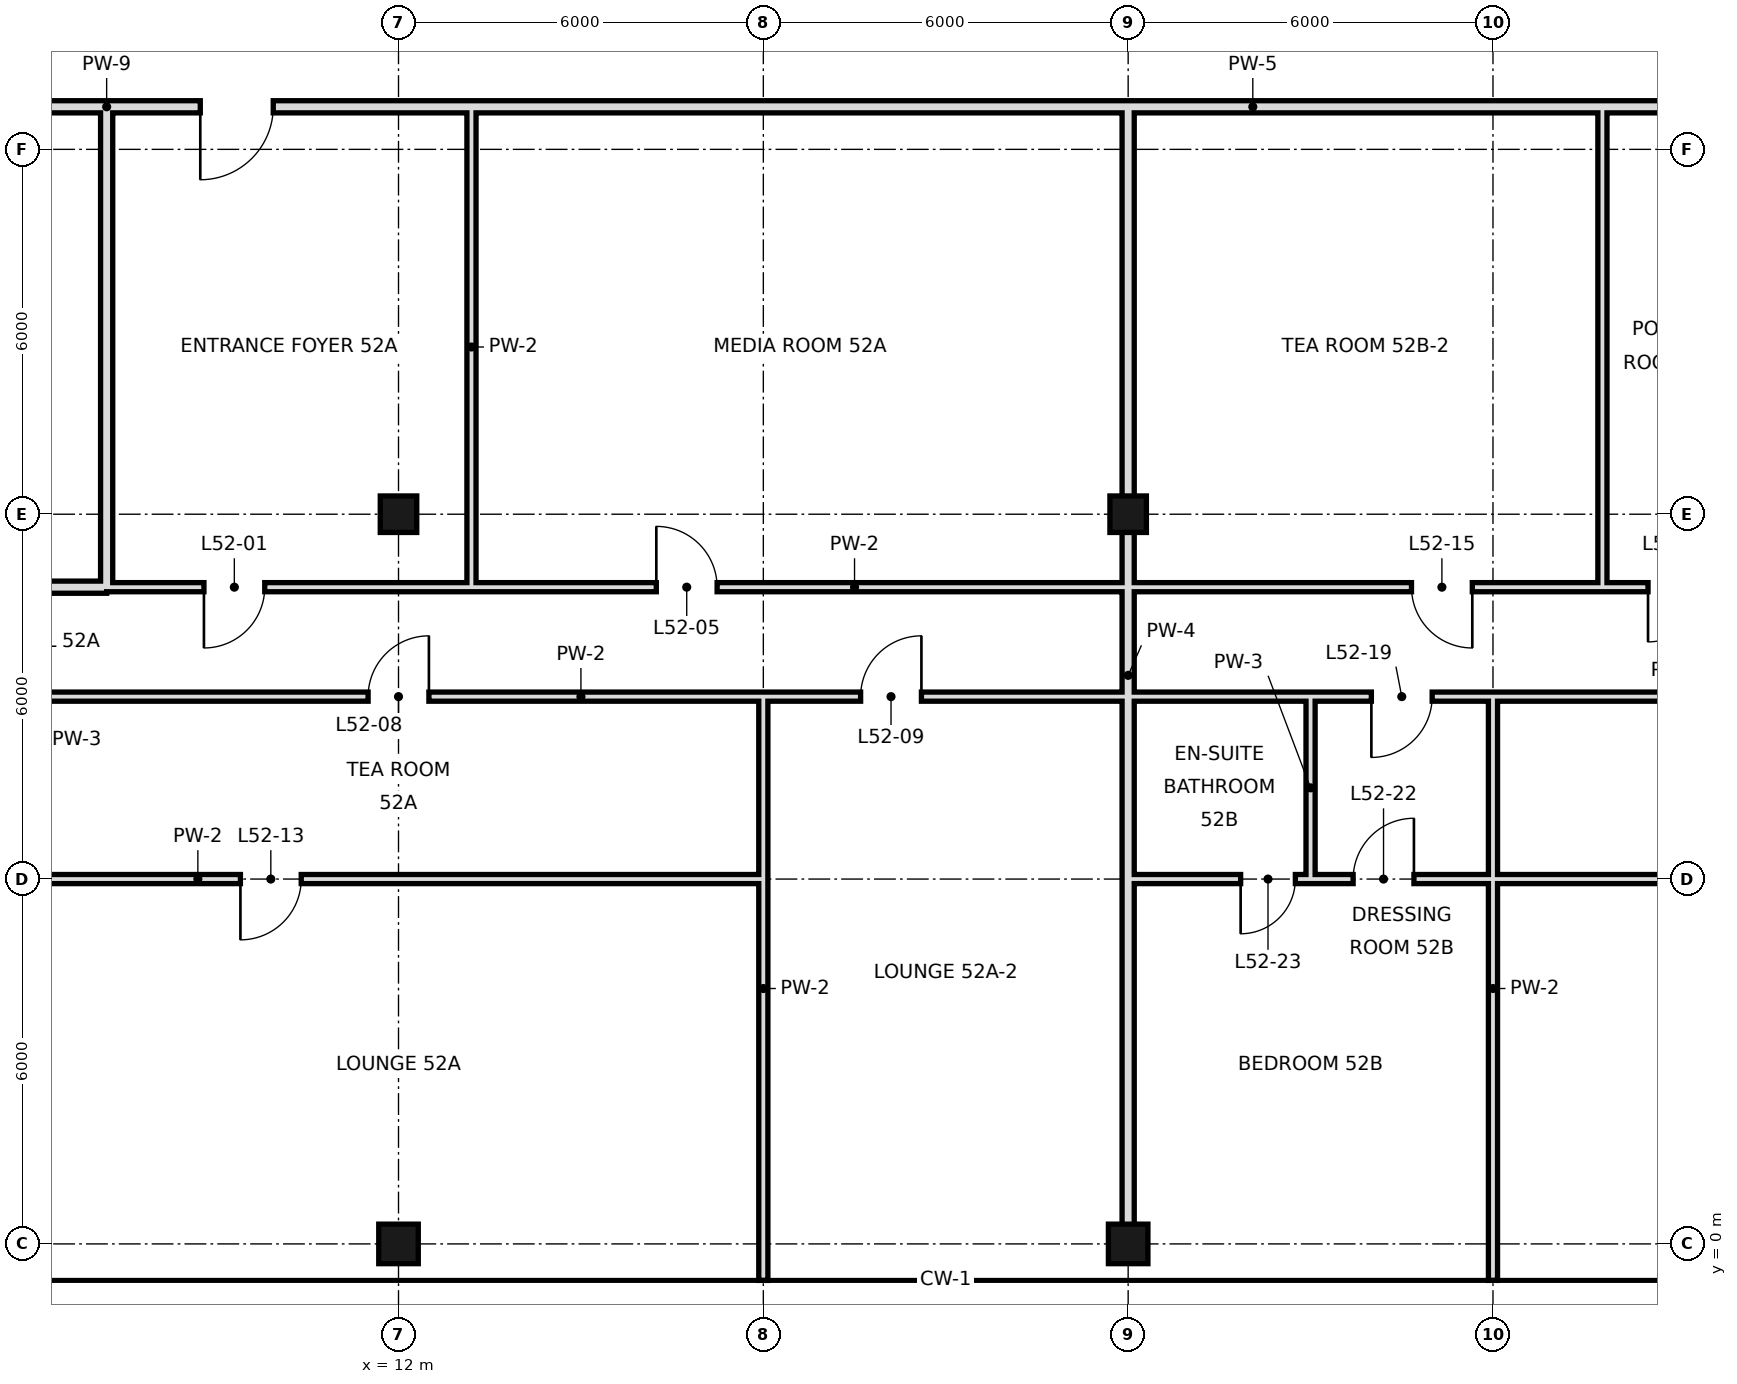
"""IFC4 building model, lengths in metres.
Left out: names, types, materials, properties, quantities, classifications, styles, units other than length and angle.
Written with IfcOpenShell. Run it as: python <this file> out.ifc"""

import sys

from ifc_helpers import new_model, si_unit, direction, frame, frame_2d, origin, origin_2d, place, context, subcontext, project, spatial, rectangle, hollow_rectangle, extrude, element, fill, save


model = new_model("IFC4")
c1 = context("Model", 3, precision=1e-05, world=origin(), true_north=direction((0.0, 1.0)))
c2 = subcontext(c1, "Body", "Model", "MODEL_VIEW")
j1 = project(units=[si_unit("LENGTHUNIT", "METRE"), si_unit("PLANEANGLEUNIT", "RADIAN")], contexts=[c1])
p1 = place(None, origin())
s1 = spatial("IfcSite", under=j1, at=p1, CompositionType="ELEMENT")
p2 = place(p1, origin())
s2 = spatial("IfcBuilding", under=s1, at=p2, CompositionType="ELEMENT")
p3 = place(p2, frame((0.0, 0.0, 222.6)))
s3 = spatial("IfcBuildingStorey", under=s2, at=p3, CompositionType="ELEMENT", Elevation=222.6)
p4 = place(p3, frame((12.0, 0.0, 0.0), z_axis=(0.0, 0.0, 1.0), x_axis=(1.0, 0.0, 0.0)))
e1 = element("IfcColumn", 1, at=p4, inside=s3, PredefinedType="COLUMN", context=c2, shape_type="SweptSolid", body=[
    extrude(hollow_rectangle(XDim=0.65, YDim=0.65, WallThickness=0.032, at=origin_2d()), origin(), (0.0, 0.0, 1.0), 3.6),
])
p5 = place(p3, frame((12.0, 12.0, 0.0), z_axis=(0.0, 0.0, 1.0), x_axis=(1.0, 0.0, 0.0)))
e2 = element("IfcColumn", 2, at=p5, inside=s3, PredefinedType="COLUMN", context=c2, shape_type="SweptSolid", body=[
    extrude(hollow_rectangle(XDim=0.6, YDim=0.6, WallThickness=0.028, at=origin_2d()), origin(), (0.0, 0.0, 1.0), 3.6),
])
p6 = place(p3, frame((24.0, 0.0, 0.0), z_axis=(0.0, 0.0, 1.0), x_axis=(1.0, 0.0, 0.0)))
e3 = element("IfcColumn", 3, at=p6, inside=s3, PredefinedType="COLUMN", context=c2, shape_type="SweptSolid", body=[
    extrude(hollow_rectangle(XDim=0.65, YDim=0.65, WallThickness=0.032, at=origin_2d()), origin(), (0.0, 0.0, 1.0), 3.6),
])
p7 = place(p3, frame((24.0, 12.0, 0.0), z_axis=(0.0, 0.0, 1.0), x_axis=(1.0, 0.0, 0.0)))
e4 = element("IfcColumn", 4, at=p7, inside=s3, PredefinedType="COLUMN", context=c2, shape_type="SweptSolid", body=[
    extrude(hollow_rectangle(XDim=0.6, YDim=0.6, WallThickness=0.028, at=origin_2d()), origin(), (0.0, 0.0, 1.0), 3.6),
])
p8 = place(p3, frame((13.2, 10.8, 0.0), z_axis=(0.0, 0.0, 1.0), x_axis=(0.0, 1.0, 0.0)))
e5 = element("IfcWall", 5, at=p8, inside=s3, PredefinedType="PARTITIONING", context=c2, shape_type="SweptSolid", body=[
    extrude(rectangle(XDim=7.9, YDim=0.15, at=frame_2d((3.95, 0.0))), origin(), (0.0, 0.0, 1.0), 3.42),
])
p9 = place(p3, frame((18.0, -0.6, 0.0), z_axis=(0.0, 0.0, 1.0), x_axis=(0.0, 1.0, 0.0)))
e6 = element("IfcWall", 6, at=p9, inside=s3, PredefinedType="PARTITIONING", context=c2, shape_type="SweptSolid", body=[
    extrude(rectangle(XDim=9.6, YDim=0.15, at=frame_2d((4.8, 0.0))), origin(), (0.0, 0.0, 1.0), 2.72),
])
p10 = place(p3, frame((24.0, 0.0, 0.0), z_axis=(0.0, 0.0, 1.0), x_axis=(0.0, 1.0, 0.0)))
e7 = element("IfcWall", 7, at=p10, inside=s3, PredefinedType="SOLIDWALL", context=c2, shape_type="SweptSolid", body=[
    extrude(rectangle(XDim=18.7, YDim=0.2, at=frame_2d((9.35, 0.0))), origin(), (0.0, 0.0, 1.0), 2.72),
])
p11 = place(p3, frame((27.0, 6.0, 0.0), z_axis=(0.0, 0.0, 1.0), x_axis=(0.0, 1.0, 0.0)))
e8 = element("IfcWall", 8, at=p11, inside=s3, PredefinedType="PARTITIONING", context=c2, shape_type="SweptSolid", body=[
    extrude(rectangle(XDim=3.0, YDim=0.15, at=frame_2d((1.5, 0.0))), origin(), (0.0, 0.0, 1.0), 3.42),
])
p12 = place(p3, frame((30.0, -0.6, 0.0), z_axis=(0.0, 0.0, 1.0), x_axis=(0.0, 1.0, 0.0)))
e9 = element("IfcWall", 9, at=p12, inside=s3, PredefinedType="PARTITIONING", context=c2, shape_type="SweptSolid", body=[
    extrude(rectangle(XDim=9.6, YDim=0.15, at=frame_2d((4.8, 0.0))), origin(), (0.0, 0.0, 1.0), 2.72),
])
p13 = place(p3, frame((31.8, 10.8, 0.0), z_axis=(0.0, 0.0, 1.0), x_axis=(0.0, 1.0, 0.0)))
e10 = element("IfcWall", 10, at=p13, inside=s3, PredefinedType="PARTITIONING", context=c2, shape_type="SweptSolid", body=[
    extrude(rectangle(XDim=7.9, YDim=0.15, at=frame_2d((3.95, 0.0))), origin(), (0.0, 0.0, 1.0), 3.42),
])
p14 = place(p3, frame((7.2, 10.8, 0.0), z_axis=(0.0, 0.0, 1.0), x_axis=(0.0, 1.0, 0.0)))
e11 = element("IfcWall", 11, at=p14, inside=s3, PredefinedType="SOLIDWALL", context=c2, shape_type="SweptSolid", body=[
    extrude(rectangle(XDim=7.9, YDim=0.2, at=frame_2d((3.95, 0.0))), origin(), (0.0, 0.0, 1.0), 2.72),
])
p15 = place(p3, frame((1.8, 10.8, 0.0), z_axis=(0.0, 0.0, 1.0), x_axis=(1.0, 0.0, 0.0)))
e12 = element("IfcWall", 12, at=p15, inside=s3, PredefinedType="SOLIDWALL", context=c2, shape_type="SweptSolid", body=[
    extrude(rectangle(XDim=5.4, YDim=0.2, at=frame_2d((2.7, 0.0))), origin(), (0.0, 0.0, 1.0), 2.72),
])
p16 = place(p15, frame((2.98, 0.0, 0.0)))
e13 = element("IfcOpeningElement", 13, at=p16, cuts=e12, PredefinedType="OPENING", context=c2, shape_type="SweptSolid", body=[
    extrude(rectangle(XDim=1.0, YDim=2.4, at=frame_2d((0.5, 1.2))), frame((0.0, 0.11, 0.0), z_axis=(0.0, -1.0, 0.0), x_axis=(1.0, 0.0, 0.0)), (0.0, 0.0, 1.0), 0.22),
])
p17 = place(p3, frame((7.2, 10.8, 0.0), z_axis=(0.0, 0.0, 1.0), x_axis=(1.0, 0.0, 0.0)))
e14 = element("IfcWall", 14, at=p17, inside=s3, PredefinedType="PARTITIONING", context=c2, shape_type="SweptSolid", body=[
    extrude(rectangle(XDim=24.6, YDim=0.15, at=frame_2d((12.3, 0.0))), origin(), (0.0, 0.0, 1.0), 3.42),
])
p18 = place(p17, frame((1.6, 0.0, 0.0)))
e15 = element("IfcOpeningElement", 15, at=p18, cuts=e14, PredefinedType="OPENING", context=c2, shape_type="SweptSolid", body=[
    extrude(rectangle(XDim=1.0, YDim=2.4, at=frame_2d((0.5, 1.2))), frame((0.0, 0.085, 0.0), z_axis=(0.0, -1.0, 0.0), x_axis=(1.0, 0.0, 0.0)), (0.0, 0.0, 1.0), 0.17),
])
p19 = place(p17, frame((9.04, 0.0, 0.0)))
e16 = element("IfcOpeningElement", 16, at=p19, cuts=e14, PredefinedType="OPENING", context=c2, shape_type="SweptSolid", body=[
    extrude(rectangle(XDim=1.0, YDim=2.4, at=frame_2d((0.5, 1.2))), frame((0.0, 0.085, 0.0), z_axis=(0.0, -1.0, 0.0), x_axis=(1.0, 0.0, 0.0)), (0.0, 0.0, 1.0), 0.17),
])
p20 = place(p17, frame((21.46, 0.0, 0.0)))
e17 = element("IfcOpeningElement", 17, at=p20, cuts=e14, PredefinedType="OPENING", context=c2, shape_type="SweptSolid", body=[
    extrude(rectangle(XDim=1.0, YDim=2.4, at=frame_2d((0.5, 1.2))), frame((0.0, 0.085, 0.0), z_axis=(0.0, -1.0, 0.0), x_axis=(1.0, 0.0, 0.0)), (0.0, 0.0, 1.0), 0.17),
])
p21 = place(p3, frame((31.8, 10.8, 0.0), z_axis=(0.0, 0.0, 1.0), x_axis=(1.0, 0.0, 0.0)))
e18 = element("IfcWall", 18, at=p21, inside=s3, PredefinedType="PARTITIONING", context=c2, shape_type="SweptSolid", body=[
    extrude(rectangle(XDim=2.4, YDim=0.15, at=frame_2d((1.2, 0.0))), origin(), (0.0, 0.0, 1.0), 3.42),
])
p22 = place(p21, frame((0.75, 0.0, 0.0)))
e19 = element("IfcOpeningElement", 19, at=p22, cuts=e18, PredefinedType="OPENING", context=c2, shape_type="SweptSolid", body=[
    extrude(rectangle(XDim=0.9, YDim=2.4, at=frame_2d((0.45, 1.2))), frame((0.0, 0.085, 0.0), z_axis=(0.0, -1.0, 0.0), x_axis=(1.0, 0.0, 0.0)), (0.0, 0.0, 1.0), 0.17),
])
p23 = place(p3, frame((7.2, 18.7, 0.0), z_axis=(0.0, 0.0, 1.0), x_axis=(1.0, 0.0, 0.0)))
e20 = element("IfcWall", 20, at=p23, inside=s3, PredefinedType="SOLIDWALL", context=c2, shape_type="SweptSolid", body=[
    extrude(rectangle(XDim=37.7, YDim=0.2, at=frame_2d((18.85, 0.0))), origin(), (0.0, 0.0, 1.0), 2.72),
])
p24 = place(p23, frame((1.54, 0.0, 0.0)))
e21 = element("IfcOpeningElement", 21, at=p24, cuts=e20, PredefinedType="OPENING", context=c2, shape_type="SweptSolid", body=[
    extrude(rectangle(XDim=1.2, YDim=2.4, at=frame_2d((0.6, 1.2))), frame((0.0, 0.11, 0.0), z_axis=(0.0, -1.0, 0.0), x_axis=(1.0, 0.0, 0.0)), (0.0, 0.0, 1.0), 0.22),
])
p25 = place(p23, frame((30.26, 0.0, 0.0)))
e22 = element("IfcOpeningElement", 22, at=p25, cuts=e20, PredefinedType="OPENING", context=c2, shape_type="SweptSolid", body=[
    extrude(rectangle(XDim=1.2, YDim=2.4, at=frame_2d((0.6, 1.2))), frame((0.0, 0.11, 0.0), z_axis=(0.0, -1.0, 0.0), x_axis=(1.0, 0.0, 0.0)), (0.0, 0.0, 1.0), 0.22),
])
p26 = place(p3, frame((3.1, 18.7, 0.0), z_axis=(0.0, 0.0, 1.0), x_axis=(1.0, 0.0, 0.0)))
e23 = element("IfcWall", 23, at=p26, inside=s3, PredefinedType="SOLIDWALL", context=c2, shape_type="SweptSolid", body=[
    extrude(rectangle(XDim=4.1, YDim=0.2, at=frame_2d((2.05, 0.0))), origin(), (0.0, 0.0, 1.0), 2.72),
])
p27 = place(p3, frame((6.0, 6.0, 0.0), z_axis=(0.0, 0.0, 1.0), x_axis=(1.0, 0.0, 0.0)))
e24 = element("IfcWall", 24, at=p27, inside=s3, PredefinedType="PARTITIONING", context=c2, shape_type="SweptSolid", body=[
    extrude(rectangle(XDim=12.0, YDim=0.15, at=frame_2d((6.0, 0.0))), origin(), (0.0, 0.0, 1.0), 2.97),
])
p28 = place(p27, frame((3.4, 0.0, 0.0)))
e25 = element("IfcOpeningElement", 25, at=p28, cuts=e24, PredefinedType="OPENING", context=c2, shape_type="SweptSolid", body=[
    extrude(rectangle(XDim=1.0, YDim=2.4, at=frame_2d((0.5, 1.2))), frame((0.0, 0.085, 0.0), z_axis=(0.0, -1.0, 0.0), x_axis=(1.0, 0.0, 0.0)), (0.0, 0.0, 1.0), 0.17),
])
p29 = place(p3, frame((27.0, 6.0, 0.0), z_axis=(0.0, 0.0, 1.0), x_axis=(1.0, 0.0, 0.0)))
e26 = element("IfcWall", 26, at=p29, inside=s3, PredefinedType="PARTITIONING", context=c2, shape_type="SweptSolid", body=[
    extrude(rectangle(XDim=27.0, YDim=0.15, at=frame_2d((13.5, 0.0))), origin(), (0.0, 0.0, 1.0), 2.97),
])
p30 = place(p29, frame((0.7, 0.0, 0.0)))
e27 = element("IfcOpeningElement", 27, at=p30, cuts=e26, PredefinedType="OPENING", context=c2, shape_type="SweptSolid", body=[
    extrude(rectangle(XDim=1.0, YDim=2.4, at=frame_2d((0.5, 1.2))), frame((0.0, 0.085, 0.0), z_axis=(0.0, -1.0, 0.0), x_axis=(1.0, 0.0, 0.0)), (0.0, 0.0, 1.0), 0.17),
])
p31 = place(p29, frame((8.1, 0.0, 0.0)))
e28 = element("IfcOpeningElement", 28, at=p31, cuts=e26, PredefinedType="OPENING", context=c2, shape_type="SweptSolid", body=[
    extrude(rectangle(XDim=1.8, YDim=2.4, at=frame_2d((0.9, 1.2))), frame((0.0, 0.085, 0.0), z_axis=(0.0, -1.0, 0.0), x_axis=(1.0, 0.0, 0.0)), (0.0, 0.0, 1.0), 0.17),
])
p32 = place(p29, frame((20.5, 0.0, 0.0)))
e29 = element("IfcOpeningElement", 29, at=p32, cuts=e26, PredefinedType="OPENING", context=c2, shape_type="SweptSolid", body=[
    extrude(rectangle(XDim=1.0, YDim=2.4, at=frame_2d((0.5, 1.2))), frame((0.0, 0.085, 0.0), z_axis=(0.0, -1.0, 0.0), x_axis=(1.0, 0.0, 0.0)), (0.0, 0.0, 1.0), 0.17),
])
p33 = place(p3, frame((24.0, 6.0, 0.0), z_axis=(0.0, 0.0, 1.0), x_axis=(1.0, 0.0, 0.0)))
e30 = element("IfcWall", 30, at=p33, inside=s3, PredefinedType="PARTITIONING", context=c2, shape_type="SweptSolid", body=[
    extrude(rectangle(XDim=3.0, YDim=0.15, at=frame_2d((1.5, 0.0))), origin(), (0.0, 0.0, 1.0), 2.97),
])
p34 = place(p33, frame((1.85, 0.0, 0.0)))
e31 = element("IfcOpeningElement", 31, at=p34, cuts=e30, PredefinedType="OPENING", context=c2, shape_type="SweptSolid", body=[
    extrude(rectangle(XDim=0.9, YDim=2.4, at=frame_2d((0.45, 1.2))), frame((0.0, 0.085, 0.0), z_axis=(0.0, -1.0, 0.0), x_axis=(1.0, 0.0, 0.0)), (0.0, 0.0, 1.0), 0.17),
])
p35 = place(p3, frame((6.0, 9.0, 0.0), z_axis=(0.0, 0.0, 1.0), x_axis=(1.0, 0.0, 0.0)))
e32 = element("IfcWall", 32, at=p35, inside=s3, PredefinedType="PARTITIONING", context=c2, shape_type="SweptSolid", body=[
    extrude(rectangle(XDim=18.0, YDim=0.15, at=frame_2d((9.0, 0.0))), origin(), (0.0, 0.0, 1.0), 3.42),
])
p36 = place(p35, frame((5.5, 0.0, 0.0)))
e33 = element("IfcOpeningElement", 33, at=p36, cuts=e32, PredefinedType="OPENING", context=c2, shape_type="SweptSolid", body=[
    extrude(rectangle(XDim=1.0, YDim=2.4, at=frame_2d((0.5, 1.2))), frame((0.0, 0.085, 0.0), z_axis=(0.0, -1.0, 0.0), x_axis=(1.0, 0.0, 0.0)), (0.0, 0.0, 1.0), 0.17),
])
p37 = place(p35, frame((13.6, 0.0, 0.0)))
e34 = element("IfcOpeningElement", 34, at=p37, cuts=e32, PredefinedType="OPENING", context=c2, shape_type="SweptSolid", body=[
    extrude(rectangle(XDim=1.0, YDim=2.4, at=frame_2d((0.5, 1.2))), frame((0.0, 0.085, 0.0), z_axis=(0.0, -1.0, 0.0), x_axis=(1.0, 0.0, 0.0)), (0.0, 0.0, 1.0), 0.17),
])
p38 = place(p3, frame((27.0, 9.0, 0.0), z_axis=(0.0, 0.0, 1.0), x_axis=(1.0, 0.0, 0.0)))
e35 = element("IfcWall", 35, at=p38, inside=s3, PredefinedType="PARTITIONING", context=c2, shape_type="SweptSolid", body=[
    extrude(rectangle(XDim=27.6, YDim=0.15, at=frame_2d((13.8, 0.0))), origin(), (0.0, 0.0, 1.0), 3.42),
])
p39 = place(p38, frame((1.0, 0.0, 0.0)))
e36 = element("IfcOpeningElement", 36, at=p39, cuts=e35, PredefinedType="OPENING", context=c2, shape_type="SweptSolid", body=[
    extrude(rectangle(XDim=1.0, YDim=2.4, at=frame_2d((0.5, 1.2))), frame((0.0, 0.085, 0.0), z_axis=(0.0, -1.0, 0.0), x_axis=(1.0, 0.0, 0.0)), (0.0, 0.0, 1.0), 0.17),
])
p40 = place(p38, frame((8.1, 0.0, 0.0)))
e37 = element("IfcOpeningElement", 37, at=p40, cuts=e35, PredefinedType="OPENING", context=c2, shape_type="SweptSolid", body=[
    extrude(rectangle(XDim=1.8, YDim=2.4, at=frame_2d((0.9, 1.2))), frame((0.0, 0.085, 0.0), z_axis=(0.0, -1.0, 0.0), x_axis=(1.0, 0.0, 0.0)), (0.0, 0.0, 1.0), 0.17),
])
p41 = place(p38, frame((20.5, 0.0, 0.0)))
e38 = element("IfcOpeningElement", 38, at=p41, cuts=e35, PredefinedType="OPENING", context=c2, shape_type="SweptSolid", body=[
    extrude(rectangle(XDim=1.0, YDim=2.4, at=frame_2d((0.5, 1.2))), frame((0.0, 0.085, 0.0), z_axis=(0.0, -1.0, 0.0), x_axis=(1.0, 0.0, 0.0)), (0.0, 0.0, 1.0), 0.17),
])
p42 = place(p3, frame((24.0, 9.0, 0.0), z_axis=(0.0, 0.0, 1.0), x_axis=(1.0, 0.0, 0.0)))
e39 = element("IfcWall", 39, at=p42, inside=s3, PredefinedType="PARTITIONING", context=c2, shape_type="SweptSolid", body=[
    extrude(rectangle(XDim=3.0, YDim=0.15, at=frame_2d((1.5, 0.0))), origin(), (0.0, 0.0, 1.0), 3.42),
])
p43 = place(p18, frame((1.0, 0.0, 0.0), z_axis=(0.0, 0.0, 1.0), x_axis=(-1.0, 0.0, 0.0)))
e40 = element("IfcDoor", 40, at=p43, inside=s3, OperationType="SINGLE_SWING_RIGHT", PredefinedType="DOOR", context=c2, shape_type="SweptSolid", body=[
    extrude(rectangle(XDim=1.0, YDim=2.4, at=frame_2d((0.5, 1.2))), frame((0.0, 0.025, 0.0), z_axis=(0.0, -1.0, 0.0), x_axis=(1.0, 0.0, 0.0)), (0.0, 0.0, 1.0), 0.05),
])
fill(e15, e40)
p44 = place(p19, origin())
e41 = element("IfcDoor", 41, at=p44, inside=s3, OperationType="SINGLE_SWING_LEFT", PredefinedType="DOOR", context=c2, shape_type="SweptSolid", body=[
    extrude(rectangle(XDim=1.0, YDim=2.4, at=frame_2d((0.5, 1.2))), frame((0.0, 0.025, 0.0), z_axis=(0.0, -1.0, 0.0), x_axis=(1.0, 0.0, 0.0)), (0.0, 0.0, 1.0), 0.05),
])
fill(e16, e41)
p45 = place(p36, frame((1.0, 0.0, 0.0), z_axis=(0.0, 0.0, 1.0), x_axis=(-1.0, 0.0, 0.0)))
e42 = element("IfcDoor", 42, at=p45, inside=s3, OperationType="SINGLE_SWING_LEFT", PredefinedType="DOOR", context=c2, shape_type="SweptSolid", body=[
    extrude(rectangle(XDim=1.0, YDim=2.4, at=frame_2d((0.5, 1.2))), frame((0.0, 0.025, 0.0), z_axis=(0.0, -1.0, 0.0), x_axis=(1.0, 0.0, 0.0)), (0.0, 0.0, 1.0), 0.05),
])
fill(e33, e42)
p46 = place(p37, frame((1.0, 0.0, 0.0), z_axis=(0.0, 0.0, 1.0), x_axis=(-1.0, 0.0, 0.0)))
e43 = element("IfcDoor", 43, at=p46, inside=s3, OperationType="SINGLE_SWING_LEFT", PredefinedType="DOOR", context=c2, shape_type="SweptSolid", body=[
    extrude(rectangle(XDim=1.0, YDim=2.4, at=frame_2d((0.5, 1.2))), frame((0.0, 0.025, 0.0), z_axis=(0.0, -1.0, 0.0), x_axis=(1.0, 0.0, 0.0)), (0.0, 0.0, 1.0), 0.05),
])
fill(e34, e43)
p47 = place(p28, frame((1.0, 0.0, 0.0), z_axis=(0.0, 0.0, 1.0), x_axis=(-1.0, 0.0, 0.0)))
e44 = element("IfcDoor", 44, at=p47, inside=s3, OperationType="SINGLE_SWING_RIGHT", PredefinedType="DOOR", context=c2, shape_type="SweptSolid", body=[
    extrude(rectangle(XDim=1.0, YDim=2.4, at=frame_2d((0.5, 1.2))), frame((0.0, 0.025, 0.0), z_axis=(0.0, -1.0, 0.0), x_axis=(1.0, 0.0, 0.0)), (0.0, 0.0, 1.0), 0.05),
])
fill(e25, e44)
p48 = place(p20, origin())
e45 = element("IfcDoor", 45, at=p48, inside=s3, OperationType="SINGLE_SWING_RIGHT", PredefinedType="DOOR", context=c2, shape_type="SweptSolid", body=[
    extrude(rectangle(XDim=1.0, YDim=2.4, at=frame_2d((0.5, 1.2))), frame((0.0, 0.025, 0.0), z_axis=(0.0, -1.0, 0.0), x_axis=(1.0, 0.0, 0.0)), (0.0, 0.0, 1.0), 0.05),
])
fill(e17, e45)
p49 = place(p22, frame((0.9, 0.0, 0.0), z_axis=(0.0, 0.0, 1.0), x_axis=(-1.0, 0.0, 0.0)))
e46 = element("IfcDoor", 46, at=p49, inside=s3, OperationType="SINGLE_SWING_RIGHT", PredefinedType="DOOR", context=c2, shape_type="SweptSolid", body=[
    extrude(rectangle(XDim=0.9, YDim=2.4, at=frame_2d((0.45, 1.2))), frame((0.0, 0.025, 0.0), z_axis=(0.0, -1.0, 0.0), x_axis=(1.0, 0.0, 0.0)), (0.0, 0.0, 1.0), 0.05),
])
fill(e19, e46)
p50 = place(p39, frame((1.0, 0.0, 0.0), z_axis=(0.0, 0.0, 1.0), x_axis=(-1.0, 0.0, 0.0)))
e47 = element("IfcDoor", 47, at=p50, inside=s3, OperationType="SINGLE_SWING_RIGHT", PredefinedType="DOOR", context=c2, shape_type="SweptSolid", body=[
    extrude(rectangle(XDim=1.0, YDim=2.4, at=frame_2d((0.5, 1.2))), frame((0.0, 0.025, 0.0), z_axis=(0.0, -1.0, 0.0), x_axis=(1.0, 0.0, 0.0)), (0.0, 0.0, 1.0), 0.05),
])
fill(e36, e47)
p51 = place(p30, frame((1.0, 0.0, 0.0), z_axis=(0.0, 0.0, 1.0), x_axis=(-1.0, 0.0, 0.0)))
e48 = element("IfcDoor", 48, at=p51, inside=s3, OperationType="SINGLE_SWING_LEFT", PredefinedType="DOOR", context=c2, shape_type="SweptSolid", body=[
    extrude(rectangle(XDim=1.0, YDim=2.4, at=frame_2d((0.5, 1.2))), frame((0.0, 0.025, 0.0), z_axis=(0.0, -1.0, 0.0), x_axis=(1.0, 0.0, 0.0)), (0.0, 0.0, 1.0), 0.05),
])
fill(e27, e48)
p52 = place(p34, frame((0.9, 0.0, 0.0), z_axis=(0.0, 0.0, 1.0), x_axis=(-1.0, 0.0, 0.0)))
e49 = element("IfcDoor", 49, at=p52, inside=s3, OperationType="SINGLE_SWING_RIGHT", PredefinedType="DOOR", context=c2, shape_type="SweptSolid", body=[
    extrude(rectangle(XDim=0.9, YDim=2.4, at=frame_2d((0.45, 1.2))), frame((0.0, 0.025, 0.0), z_axis=(0.0, -1.0, 0.0), x_axis=(1.0, 0.0, 0.0)), (0.0, 0.0, 1.0), 0.05),
])
fill(e31, e49)
p53 = place(p24, frame((1.2, 0.0, 0.0), z_axis=(0.0, 0.0, 1.0), x_axis=(-1.0, 0.0, 0.0)))
e50 = element("IfcDoor", 50, at=p53, inside=s3, OperationType="SINGLE_SWING_RIGHT", PredefinedType="DOOR", context=c2, shape_type="SweptSolid", body=[
    extrude(rectangle(XDim=1.2, YDim=2.4, at=frame_2d((0.6, 1.2))), frame((0.0, 0.025, 0.0), z_axis=(0.0, -1.0, 0.0), x_axis=(1.0, 0.0, 0.0)), (0.0, 0.0, 1.0), 0.05),
])
fill(e21, e50)
save(model, sys.argv[1])
